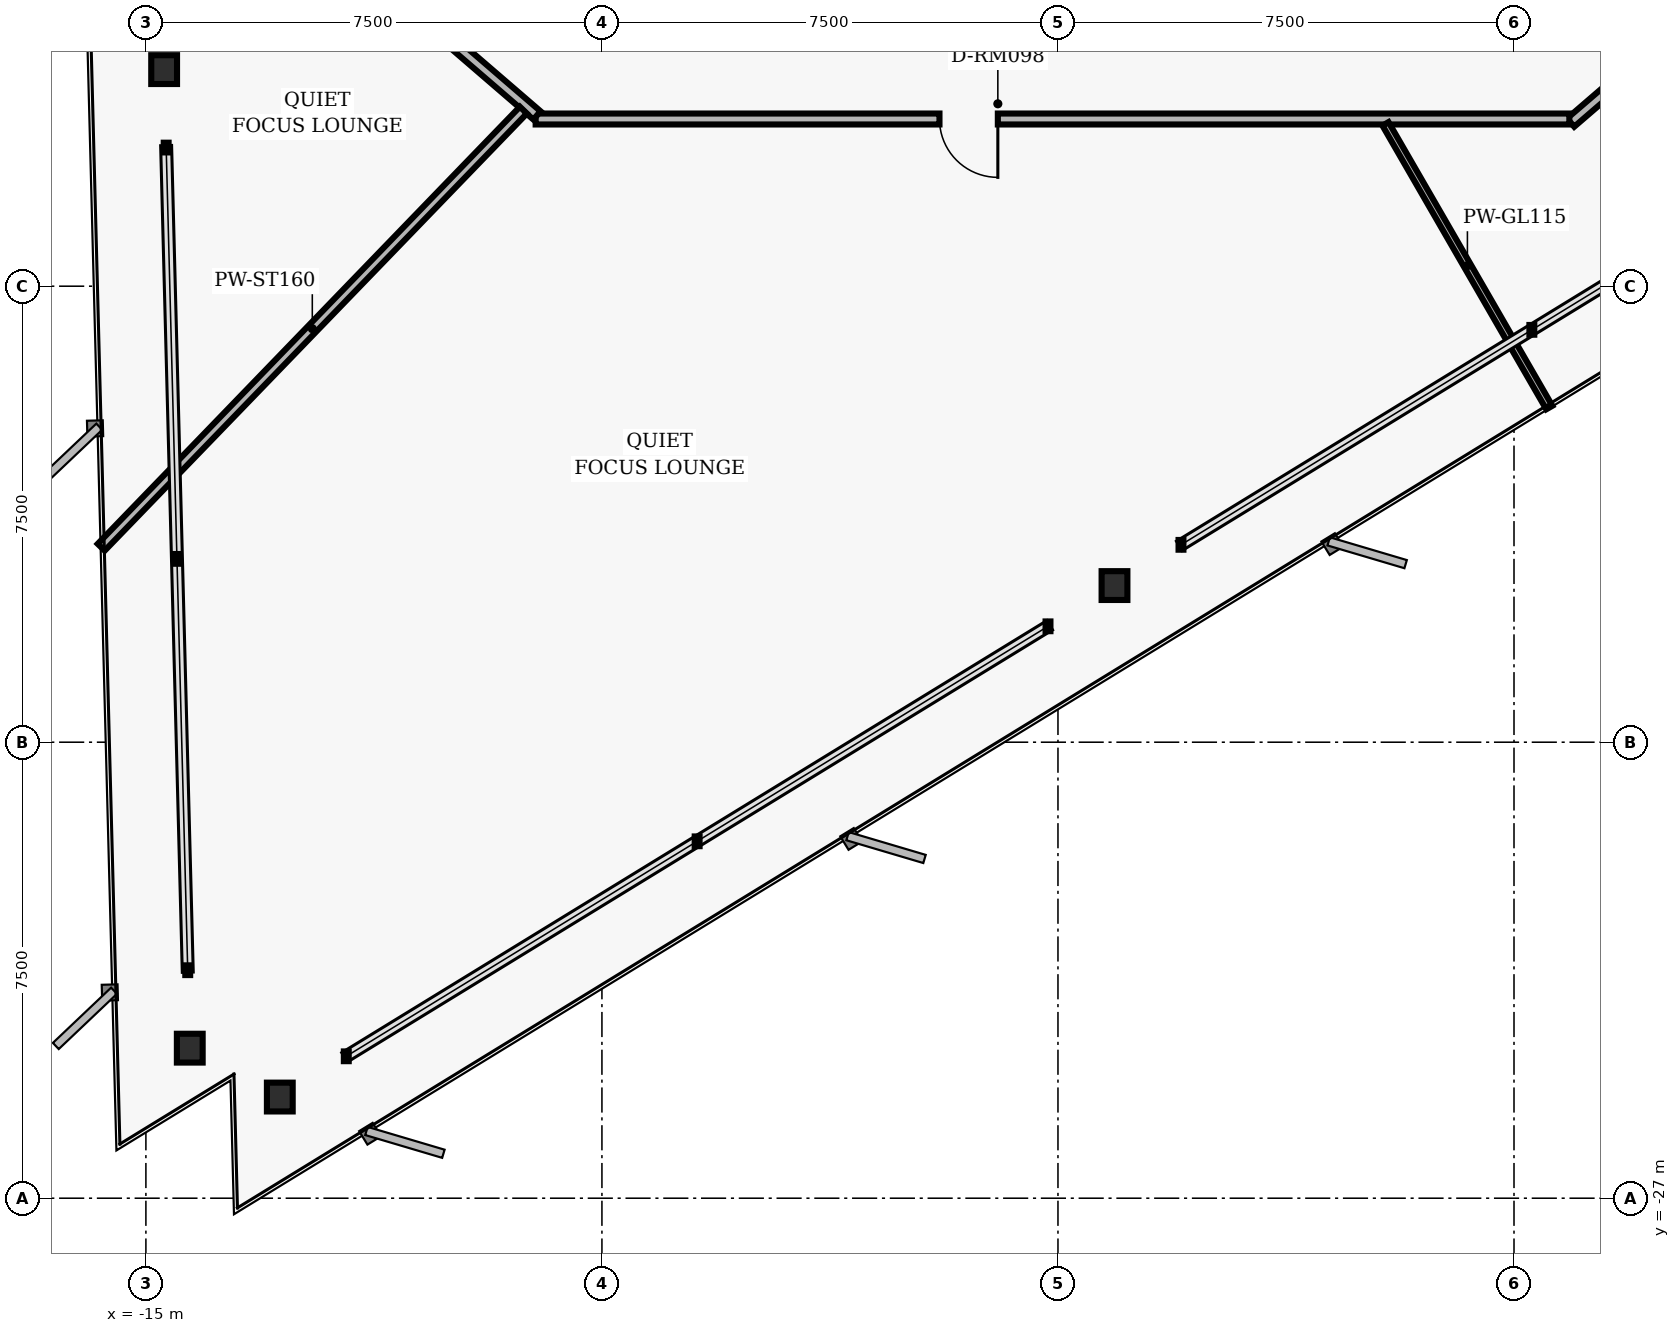
"""IFC4 building model, lengths in metres.
Left out: names, types, materials, properties, quantities, classifications, styles, units other than length and angle.
Written with IfcOpenShell. Run it as: python <this file> out.ifc"""

import sys

from ifc_helpers import new_model, si_unit, direction, frame, frame_2d, origin, origin_2d, place, context, subcontext, project, spatial, rectangle, i_section, extrude, element, fill, save


model = new_model("IFC4")
c1 = context("Model", 3, precision=1e-05, world=origin(), true_north=direction((0.0, 1.0)))
c2 = subcontext(c1, "Body", "Model", "MODEL_VIEW")
j1 = project(units=[si_unit("LENGTHUNIT", "METRE"), si_unit("PLANEANGLEUNIT", "RADIAN")], contexts=[c1])
p1 = place(None, origin())
s1 = spatial("IfcSite", under=j1, at=p1, CompositionType="ELEMENT")
p2 = place(p1, origin())
s2 = spatial("IfcBuilding", under=s1, at=p2, CompositionType="ELEMENT")
p3 = place(p2, frame((0.0, 0.0, 42.4)))
s3 = spatial("IfcBuildingStorey", under=s2, at=p3, CompositionType="ELEMENT", Elevation=42.4)
for number, where, z_axis, x_axis in (
    (1, (-14.7, -8.438, 0.0), (0.0, 0.0, 1.0), (1.0, 0.0, 0.0)),
    (2, (-14.279, -24.532, 0.0), (0.0, 0.0, 1.0), (1.0, 0.0, 0.0)),
    (3, (-12.798, -25.336, 0.0), (0.0, 0.0, 1.0), (1.0, 0.0, 0.0)),
    (4, (0.93, -16.924, 0.0), (0.0, 0.0, 1.0), (1.0, 0.0, 0.0)),
):
    element("IfcColumn", number, at=place(p3, frame(where, z_axis=z_axis, x_axis=x_axis)), inside=s3, PredefinedType="COLUMN", context=c2, shape_type="SweptSolid", body=[
        extrude(i_section(OverallWidth=0.424, OverallDepth=0.474, WebThickness=0.048, FlangeThickness=0.077, FilletRadius=0.025, at=origin_2d()), origin(), (0.0, 0.0, 1.0), 3.36),
    ])
p4 = place(p3, frame((13.268, -5.141, 0.0), z_axis=(0.0, 0.0, 1.0), x_axis=(-0.757534501725, -0.65279512766, 0.0)))
e5 = element("IfcWall", 5, at=p4, inside=s3, PredefinedType="PARTITIONING", context=c2, shape_type="SweptSolid", body=[
    extrude(rectangle(XDim=6.385, YDim=0.18, at=frame_2d((3.192, 0.0))), origin(), (0.0, 0.0, 1.0), 2.527),
])
p5 = place(p4, frame((2.712, 0.0, 0.0)))
e6 = element("IfcOpeningElement", 6, at=p5, cuts=e5, PredefinedType="OPENING", context=c2, shape_type="SweptSolid", body=[
    extrude(rectangle(XDim=0.96, YDim=2.02, at=frame_2d((0.48, 1.01))), frame((0.0, 0.1, 0.0), z_axis=(0.0, -1.0, 0.0), x_axis=(1.0, 0.0, 0.0)), (0.0, 0.0, 1.0), 0.2),
])
p6 = place(p3, frame((8.41, -9.25, 0.0), z_axis=(0.0, 0.0, 1.0), x_axis=(-1.0, 0.0, 0.0)))
e7 = element("IfcWall", 7, at=p6, inside=s3, PredefinedType="PARTITIONING", context=c2, shape_type="SweptSolid", body=[
    extrude(rectangle(XDim=17.0, YDim=0.18, at=frame_2d((8.5, 0.0))), origin(), (0.0, 0.0, 1.0), 2.527),
])
p7 = place(p6, frame((9.399, 0.0, 0.0)))
e8 = element("IfcOpeningElement", 8, at=p7, cuts=e7, PredefinedType="OPENING", context=c2, shape_type="SweptSolid", body=[
    extrude(rectangle(XDim=0.96, YDim=2.02, at=frame_2d((0.48, 1.01))), frame((0.0, 0.1, 0.0), z_axis=(0.0, -1.0, 0.0), x_axis=(1.0, 0.0, 0.0)), (0.0, 0.0, 1.0), 0.2),
])
p8 = place(p3, frame((-8.568, -9.191, 0.0), z_axis=(0.0, 0.0, 1.0), x_axis=(-0.757556899173, 0.652769135694, 0.0)))
e9 = element("IfcWall", 9, at=p8, inside=s3, PredefinedType="PARTITIONING", context=c2, shape_type="SweptSolid", body=[
    extrude(rectangle(XDim=6.204, YDim=0.18, at=frame_2d((3.102, 0.0))), origin(), (0.0, 0.0, 1.0), 3.013),
])
p9 = place(p3, frame((-8.792, -9.104, 0.0), z_axis=(0.0, 0.0, 1.0), x_axis=(-0.694663387969, -0.719334954952, 0.0)))
e10 = element("IfcWall", 10, at=p9, inside=s3, PredefinedType="PARTITIONING", context=c2, shape_type="SweptSolid", body=[
    extrude(rectangle(XDim=9.995, YDim=0.16, at=frame_2d((4.997, 0.0))), origin(), (0.0, 0.0, 1.0), 3.013),
])
p10 = place(p3, frame((5.387, -9.33, 0.0), z_axis=(0.0, 0.0, 1.0), x_axis=(0.500023165436, -0.866012028801, 0.0)))
e11 = element("IfcWall", 11, at=p10, inside=s3, PredefinedType="MOVABLE", context=c2, shape_type="SweptSolid", body=[
    extrude(rectangle(XDim=5.388, YDim=0.115, at=frame_2d((2.694, 0.0))), origin(), (0.0, 0.0, 1.0), 3.013),
])
p11 = place(p7, origin())
e12 = element("IfcDoor", 12, at=p11, inside=s3, OperationType="SINGLE_SWING_LEFT", PredefinedType="DOOR", context=c2, shape_type="SweptSolid", body=[
    extrude(rectangle(XDim=0.96, YDim=2.02, at=frame_2d((0.48, 1.01))), frame((0.0, 0.025, 0.0), z_axis=(0.0, -1.0, 0.0), x_axis=(1.0, 0.0, 0.0)), (0.0, 0.0, 1.0), 0.05),
])
fill(e8, e12)
save(model, sys.argv[1])
